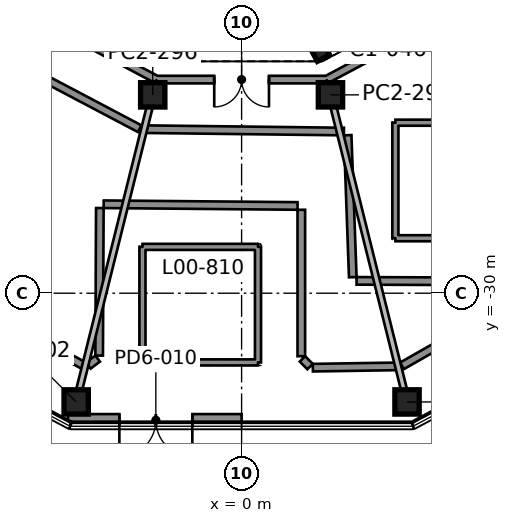
"""IFC4 building model, lengths in metres.
Left out: names, types, materials, properties, quantities, classifications, styles, units other than length and angle.
Written with IfcOpenShell. Run it as: python <this file> out.ifc"""

import sys

from ifc_helpers import new_model, si_unit, direction, frame, frame_2d, origin, origin_2d, place, context, subcontext, project, spatial, rectangle, i_section, extrude, element, fill, save


model = new_model("IFC4")
c1 = context("Model", 3, precision=1e-05, world=origin(), true_north=direction((0.0, 1.0)))
c2 = subcontext(c1, "Body", "Model", "MODEL_VIEW")
j1 = project(units=[si_unit("LENGTHUNIT", "METRE"), si_unit("PLANEANGLEUNIT", "RADIAN")], contexts=[c1])
p1 = place(None, origin())
s1 = spatial("IfcSite", under=j1, at=p1, CompositionType="ELEMENT")
p2 = place(p1, origin())
s2 = spatial("IfcBuilding", under=s1, at=p2, CompositionType="ELEMENT")
p3 = place(p2, origin())
s3 = spatial("IfcBuildingStorey", under=s2, at=p3, CompositionType="ELEMENT", Elevation=0.0)
for number, where, z_axis, x_axis in (
    (1, (-2.559, -22.017, 0.0), (0.0, 0.0, 1.0), (1.0, 0.0, 0.0)),
    (2, (2.559, -22.017, 0.0), (0.0, 0.0, 1.0), (0.883, 0.469, 0.0)),
):
    element("IfcColumn", number, at=place(p3, frame(where, z_axis=z_axis, x_axis=x_axis)), inside=s3, PredefinedType="COLUMN", context=c2, shape_type="SweptSolid", body=[
        extrude(i_section(OverallWidth=0.455, OverallDepth=0.569, WebThickness=0.078, FlangeThickness=0.125, FilletRadius=0.015, at=origin_2d()), origin(), (0.0, 0.0, 1.0), 7.0),
    ])
for number, where, z_axis, x_axis in (
    (3, (-5.441, -33.576, 0.0), (0.0, 0.0, 1.0), (1.0, 0.0, 0.0)),
    (4, (5.441, -33.576, 0.0), (0.0, 0.0, 1.0), (1.0, 0.0, 0.0)),
    (5, (-2.923, -23.476, 0.0), (0.0, 0.0, 1.0), (1.0, 0.0, 0.0)),
    (6, (2.923, -23.476, 0.0), (0.0, 0.0, 1.0), (1.0, 0.0, 0.0)),
):
    element("IfcColumn", number, at=place(p3, frame(where, z_axis=z_axis, x_axis=x_axis)), inside=s3, PredefinedType="COLUMN", context=c2, shape_type="SweptSolid", body=[
        extrude(rectangle(XDim=0.8, YDim=0.8, at=origin_2d()), origin(), (0.0, 0.0, 1.0), 6.37),
    ])
p4 = place(p3, frame((-5.711, -34.176, 0.0), z_axis=(0.0, 0.0, 1.0), x_axis=(1.0, 0.0, 0.0)))
e7 = element("IfcWall", 7, at=p4, inside=s3, PredefinedType="SOLIDWALL", context=c2, shape_type="SweptSolid", body=[
    extrude(rectangle(XDim=5.711, YDim=0.4, at=frame_2d((2.855, 0.0))), origin(), (0.0, 0.0, 1.0), 6.37),
])
p5 = place(p4, frame((1.69, 0.0, 0.0)))
e8 = element("IfcOpeningElement", 8, at=p5, cuts=e7, PredefinedType="OPENING", context=c2, shape_type="SweptSolid", body=[
    extrude(rectangle(XDim=2.4, YDim=2.4, at=frame_2d((1.2, 1.2))), frame((0.0, 0.21, 0.0), z_axis=(0.0, -1.0, 0.0), x_axis=(1.0, 0.0, 0.0)), (0.0, 0.0, 1.0), 0.42),
])
p6 = place(p3, frame((1.841, -27.131, 7.0), z_axis=(0.0, 0.0, 1.0), x_axis=(-0.999960898907, 0.008843113497, 0.0)))
e9 = element("IfcWall", 9, at=p6, inside=s3, PredefinedType="STANDARD", context=c2, shape_type="SweptSolid", body=[
    extrude(rectangle(XDim=6.377, YDim=0.25, at=frame_2d((3.189, 0.0))), origin(), (0.0, 0.0, 1.0), 0.65),
])
p7 = place(p3, frame((-4.663, -27.199, 7.0), z_axis=(0.0, 0.0, 1.0), x_axis=(-0.004679194057, -0.999989052512, 0.0)))
e10 = element("IfcWall", 10, at=p7, inside=s3, PredefinedType="STANDARD", context=c2, shape_type="SweptSolid", body=[
    extrude(rectangle(XDim=4.852, YDim=0.25, at=frame_2d((2.426, 0.0))), origin(), (0.0, 0.0, 1.0), 0.65),
])
p8 = place(p3, frame((-4.735, -32.15, 7.0), z_axis=(0.0, 0.0, 1.0), x_axis=(-0.799153268781, -0.601127318458, 0.0)))
e11 = element("IfcWall", 11, at=p8, inside=s3, PredefinedType="STANDARD", context=c2, shape_type="SweptSolid", body=[
    extrude(rectangle(XDim=0.381, YDim=0.25, at=frame_2d((0.19, 0.0))), origin(), (0.0, 0.0, 1.0), 0.65),
])
p9 = place(p3, frame((-5.174, -32.39, 7.0), z_axis=(0.0, 0.0, 1.0), x_axis=(-0.880676930477, 0.473717367347, 0.0)))
e12 = element("IfcWall", 12, at=p9, inside=s3, PredefinedType="STANDARD", context=c2, shape_type="SweptSolid", body=[
    extrude(rectangle(XDim=14.2, YDim=0.25, at=frame_2d((7.1, 0.0))), origin(), (0.0, 0.0, 1.0), 0.65),
])
p10 = place(p3, frame((-13.972, -18.988, 7.0), z_axis=(0.0, 0.0, 1.0), x_axis=(0.884508535328, -0.466524008955, 0.0)))
e13 = element("IfcWall", 13, at=p10, inside=s3, PredefinedType="STANDARD", context=c2, shape_type="SweptSolid", body=[
    extrude(rectangle(XDim=12.006, YDim=0.25, at=frame_2d((6.003, 0.0))), origin(), (0.0, 0.0, 1.0), 0.65),
])
p11 = place(p3, frame((-3.295, -24.604, 7.0), z_axis=(0.0, 0.0, 1.0), x_axis=(0.999929472712, -0.011876430557, 0.0)))
e14 = element("IfcWall", 14, at=p11, inside=s3, PredefinedType="STANDARD", context=c2, shape_type="SweptSolid", body=[
    extrude(rectangle(XDim=6.66, YDim=0.25, at=frame_2d((3.33, 0.0))), origin(), (0.0, 0.0, 1.0), 0.65),
])
p12 = place(p3, frame((3.488, -24.803, 7.0), z_axis=(0.0, 0.0, 1.0), x_axis=(0.036099618573, -0.999348196345, 0.0)))
e15 = element("IfcWall", 15, at=p12, inside=s3, PredefinedType="STANDARD", context=c2, shape_type="SweptSolid", body=[
    extrude(rectangle(XDim=4.673, YDim=0.25, at=frame_2d((2.336, 0.0))), origin(), (0.0, 0.0, 1.0), 0.65),
])
p13 = place(p3, frame((3.781, -29.594, 7.0), z_axis=(0.0, 0.0, 1.0), x_axis=(0.99999144192, -0.004137159309, 0.0)))
e16 = element("IfcWall", 16, at=p13, inside=s3, PredefinedType="STANDARD", context=c2, shape_type="SweptSolid", body=[
    extrude(rectangle(XDim=5.488, YDim=0.25, at=frame_2d((2.744, 0.0))), origin(), (0.0, 0.0, 1.0), 0.65),
])
p14 = place(p3, frame((9.46, -30.009, 7.0), z_axis=(0.0, 0.0, 1.0), x_axis=(-0.86931446801, -0.494259401234, 0.0)))
e17 = element("IfcWall", 17, at=p14, inside=s3, PredefinedType="STANDARD", context=c2, shape_type="SweptSolid", body=[
    extrude(rectangle(XDim=4.815, YDim=0.25, at=frame_2d((2.407, 0.0))), origin(), (0.0, 0.0, 1.0), 0.65),
])
p15 = place(p3, frame((5.214, -32.405, 7.0), z_axis=(0.0, 0.0, 1.0), x_axis=(-0.999881577191, -0.015389333799, 0.0)))
e18 = element("IfcWall", 18, at=p15, inside=s3, PredefinedType="STANDARD", context=c2, shape_type="SweptSolid", body=[
    extrude(rectangle(XDim=2.871, YDim=0.25, at=frame_2d((1.436, 0.0))), origin(), (0.0, 0.0, 1.0), 0.65),
])
p16 = place(p3, frame((2.253, -32.412, 7.0), z_axis=(0.0, 0.0, 1.0), x_axis=(-0.707449122826, 0.706764273724, 0.0)))
e19 = element("IfcWall", 19, at=p16, inside=s3, PredefinedType="STANDARD", context=c2, shape_type="SweptSolid", body=[
    extrude(rectangle(XDim=0.356, YDim=0.25, at=frame_2d((0.178, 0.0))), origin(), (0.0, 0.0, 1.0), 0.65),
])
p17 = place(p3, frame((1.964, -32.072, 7.0), z_axis=(0.0, 0.0, 1.0), x_axis=(0.0, 1.0, 0.0)))
e20 = element("IfcWall", 20, at=p17, inside=s3, PredefinedType="STANDARD", context=c2, shape_type="SweptSolid", body=[
    extrude(rectangle(XDim=4.816, YDim=0.25, at=frame_2d((2.408, 0.0))), origin(), (0.0, 0.0, 1.0), 0.65),
])
for number, where, z_axis, x_axis in (
    (21, (8.858, -28.192, 6.92), (0.0, 0.0, 1.0), (-1.0, 0.0, 0.0)),
    (22, (5.058, -28.192, 6.92), (0.0, 0.0, 1.0), (0.0, 1.0, 0.0)),
    (23, (5.058, -24.392, 6.92), (0.0, 0.0, 1.0), (1.0, 0.0, 0.0)),
):
    element("IfcWall", number, at=place(p3, frame(where, z_axis=z_axis, x_axis=x_axis)), inside=s3, PredefinedType="SOLIDWALL", context=c2, shape_type="SweptSolid", body=[
        extrude(rectangle(XDim=3.8, YDim=0.2, at=frame_2d((1.9, 0.0))), origin(), (0.0, 0.0, 1.0), 0.18),
    ])
p18 = place(p3, frame((0.539, -32.276, 6.92), z_axis=(0.0, 0.0, 1.0), x_axis=(-1.0, 0.0, 0.0)))
e24 = element("IfcWall", 24, at=p18, inside=s3, PredefinedType="SOLIDWALL", context=c2, shape_type="SweptSolid", body=[
    extrude(rectangle(XDim=3.8, YDim=0.2, at=frame_2d((1.9, 0.0))), origin(), (0.0, 0.0, 1.0), 0.18),
])
p19 = place(p3, frame((-3.261, -32.276, 6.92), z_axis=(0.0, 0.0, 1.0), x_axis=(0.0, 1.0, 0.0)))
e25 = element("IfcWall", 25, at=p19, inside=s3, PredefinedType="SOLIDWALL", context=c2, shape_type="SweptSolid", body=[
    extrude(rectangle(XDim=3.8, YDim=0.2, at=frame_2d((1.9, 0.0))), origin(), (0.0, 0.0, 1.0), 0.18),
])
p20 = place(p3, frame((-3.261, -28.476, 6.92), z_axis=(0.0, 0.0, 1.0), x_axis=(1.0, 0.0, 0.0)))
e26 = element("IfcWall", 26, at=p20, inside=s3, PredefinedType="SOLIDWALL", context=c2, shape_type="SweptSolid", body=[
    extrude(rectangle(XDim=3.8, YDim=0.2, at=frame_2d((1.9, 0.0))), origin(), (0.0, 0.0, 1.0), 0.18),
])
p21 = place(p3, frame((0.539, -28.476, 6.92), z_axis=(0.0, 0.0, 1.0), x_axis=(0.0, -1.0, 0.0)))
e27 = element("IfcWall", 27, at=p21, inside=s3, PredefinedType="SOLIDWALL", context=c2, shape_type="SweptSolid", body=[
    extrude(rectangle(XDim=3.8, YDim=0.2, at=frame_2d((1.9, 0.0))), origin(), (0.0, 0.0, 1.0), 0.18),
])
p22 = place(p3, frame((3.023, -23.876, 0.0), z_axis=(0.0, 0.0, 1.0), x_axis=(0.241930250256, -0.970293643188, 0.0)))
e28 = element("IfcWall", 28, at=p22, inside=s3, PredefinedType="PARTITIONING", context=c2, shape_type="SweptSolid", body=[
    extrude(rectangle(XDim=9.585, YDim=0.2, at=frame_2d((4.792, 0.0))), origin(), (0.0, 0.0, 1.0), 6.37),
])
p23 = place(p3, frame((10.165, -19.057, 0.0), z_axis=(0.0, 0.0, 1.0), x_axis=(-0.882987691761, -0.469396139949, 0.0)))
e29 = element("IfcWall", 29, at=p23, inside=s3, PredefinedType="SOLIDWALL", context=c2, shape_type="SweptSolid", body=[
    extrude(rectangle(XDim=8.347, YDim=0.25, at=frame_2d((4.174, 0.0))), origin(), (0.0, 0.0, 1.0), 6.37),
])
p24 = place(p3, frame((-5.342, -33.176, 0.0), z_axis=(0.0, 0.0, 1.0), x_axis=(0.241930250256, 0.970293643188, 0.0)))
e30 = element("IfcWall", 30, at=p24, inside=s3, PredefinedType="PARTITIONING", context=c2, shape_type="SweptSolid", body=[
    extrude(rectangle(XDim=9.585, YDim=0.2, at=frame_2d((4.792, 0.0))), origin(), (0.0, 0.0, 1.0), 6.37),
])
p25 = place(p3, frame((-2.794, -22.976, 0.0), z_axis=(0.0, 0.0, 1.0), x_axis=(-0.882976758677, 0.469416705749, 0.0)))
e31 = element("IfcWall", 31, at=p25, inside=s3, PredefinedType="SOLIDWALL", context=c2, shape_type="SweptSolid", body=[
    extrude(rectangle(XDim=8.624, YDim=0.25, at=frame_2d((4.312, 0.0))), origin(), (0.0, 0.0, 1.0), 6.37),
])
p26 = place(p3, frame((2.802, -22.974, 0.0), z_axis=(0.0, 0.0, 1.0), x_axis=(-1.0, 0.0, 0.0)))
e32 = element("IfcWall", 32, at=p26, inside=s3, PredefinedType="SOLIDWALL", context=c2, shape_type="SweptSolid", body=[
    extrude(rectangle(XDim=5.604, YDim=0.25, at=frame_2d((2.802, 0.0))), origin(), (0.0, 0.0, 1.0), 6.37),
])
p27 = place(p26, frame((1.902, 0.0, 0.0)))
e33 = element("IfcOpeningElement", 33, at=p27, cuts=e32, PredefinedType="OPENING", context=c2, shape_type="SweptSolid", body=[
    extrude(rectangle(XDim=1.8, YDim=2.1, at=frame_2d((0.9, 1.05))), frame((0.0, 0.135, 0.0), z_axis=(0.0, -1.0, 0.0), x_axis=(1.0, 0.0, 0.0)), (0.0, 0.0, 1.0), 0.27),
])
p28 = place(p5, frame((2.4, 0.0, 0.0), z_axis=(0.0, 0.0, 1.0), x_axis=(-1.0, 0.0, 0.0)))
e34 = element("IfcDoor", 34, at=p28, inside=s3, OperationType="DOUBLE_DOOR_SINGLE_SWING", PredefinedType="DOOR", context=c2, shape_type="SweptSolid", body=[
    extrude(rectangle(XDim=2.4, YDim=2.4, at=frame_2d((1.2, 1.2))), frame((0.0, 0.025, 0.0), z_axis=(0.0, -1.0, 0.0), x_axis=(1.0, 0.0, 0.0)), (0.0, 0.0, 1.0), 0.05),
])
fill(e8, e34)
p29 = place(p3, frame((0.0, 0.0, 6.37)))
p30 = place(p29, frame((6.958, -26.292, 0.0)))
p31 = place(p30, frame((0.0, 0.0, 0.5)))
e35 = element("IfcWindow", 35, at=p31, inside=s3, PartitioningType="SINGLE_PANEL", PredefinedType="SKYLIGHT", context=c2, shape_type="SweptSolid", body=[
    extrude(rectangle(XDim=3.6, YDim=3.6, at=origin_2d()), origin(), (0.0, 0.0, 1.0), 0.05),
])
p32 = place(p29, frame((-1.361, -30.376, 0.0)))
p33 = place(p32, frame((0.0, 0.0, 0.5)))
e36 = element("IfcWindow", 36, at=p33, inside=s3, PartitioningType="SINGLE_PANEL", PredefinedType="SKYLIGHT", context=c2, shape_type="SweptSolid", body=[
    extrude(rectangle(XDim=3.6, YDim=3.6, at=origin_2d()), origin(), (0.0, 0.0, 1.0), 0.05),
])
p34 = place(p27, origin())
e37 = element("IfcDoor", 37, at=p34, inside=s3, OperationType="DOUBLE_DOOR_SINGLE_SWING", PredefinedType="DOOR", context=c2, shape_type="SweptSolid", body=[
    extrude(rectangle(XDim=1.8, YDim=2.1, at=frame_2d((0.9, 1.05))), frame((0.0, 0.025, 0.0), z_axis=(0.0, -1.0, 0.0), x_axis=(1.0, 0.0, 0.0)), (0.0, 0.0, 1.0), 0.05),
])
fill(e33, e37)
save(model, sys.argv[1])
